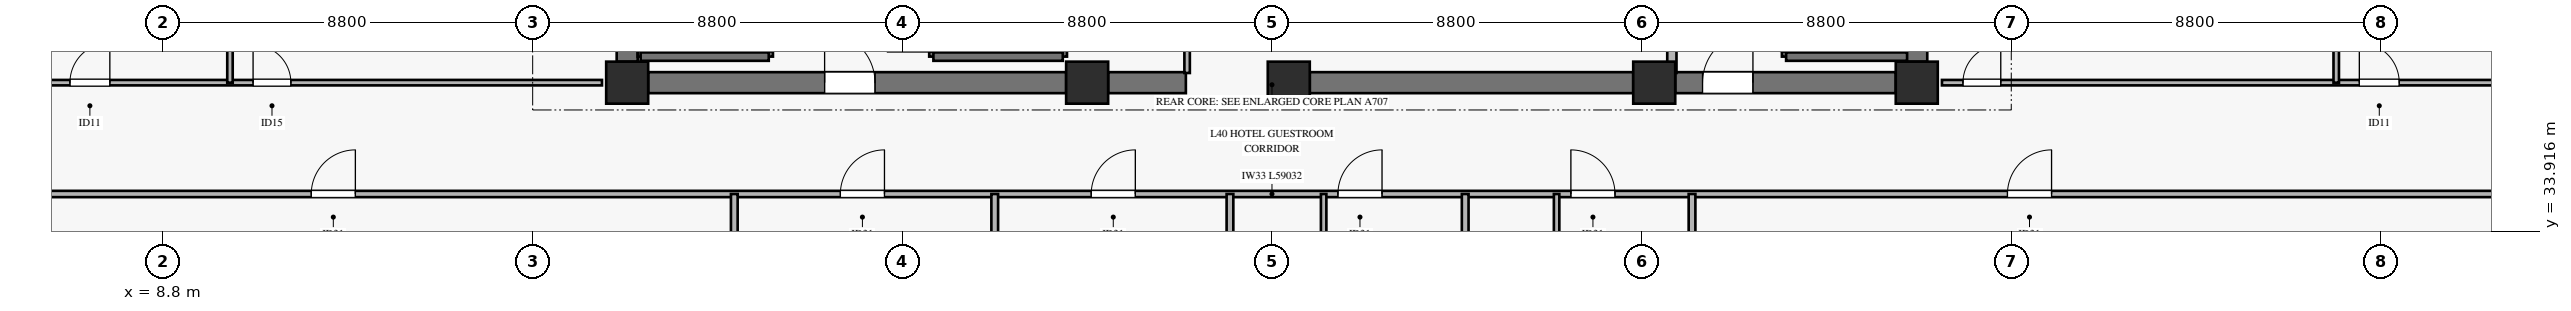
"""IFC4 building model, lengths in metres.
Left out: names, types, materials, properties, quantities, classifications, styles, units other than length and angle.
Written with IfcOpenShell. Run it as: python <this file> out.ifc"""

import sys

from ifc_helpers import new_model, si_unit, direction, frame, frame_2d, origin, origin_2d, place, context, subcontext, project, spatial, rectangle, extrude, source, transform, mapped, element, fill, save


model = new_model("IFC4")
c1 = context("Model", 3, precision=1e-05, world=origin(), true_north=direction((0.0, 1.0)))
c2 = subcontext(c1, "Body", "Model", "MODEL_VIEW")
j1 = project(units=[si_unit("LENGTHUNIT", "METRE"), si_unit("PLANEANGLEUNIT", "RADIAN")], contexts=[c1])
p1 = place(None, origin())
s1 = spatial("IfcSite", under=j1, at=p1, CompositionType="ELEMENT")
p2 = place(p1, origin())
s2 = spatial("IfcBuilding", under=s1, at=p2, CompositionType="ELEMENT")
p3 = place(p2, frame((0.0, 0.0, 163.2)))
s3 = spatial("IfcBuildingStorey", under=s2, at=p3, CompositionType="ELEMENT", Elevation=163.2)
m1 = source(origin(), c2, "Body", "SweptSolid", [
    extrude(rectangle(XDim=1.0, YDim=1.0, at=origin_2d()), origin(), (0.0, 0.0, 1.0), 3.27),
])
for number, where, z_axis, x_axis in (
    (1, (19.85, 37.45, 0.0), (0.0, 0.0, 1.0), (1.0, 0.0, 0.0)),
    (2, (30.8, 37.45, 0.0), (0.0, 0.0, 1.0), (1.0, 0.0, 0.0)),
    (3, (35.6, 37.45, 0.0), (0.0, 0.0, 1.0), (1.0, 0.0, 0.0)),
    (4, (44.3, 37.45, 0.0), (0.0, 0.0, 1.0), (1.0, 0.0, 0.0)),
    (5, (50.55, 37.45, 0.0), (0.0, 0.0, 1.0), (1.0, 0.0, 0.0)),
):
    element("IfcColumn", number, at=place(p3, frame(where, z_axis=z_axis, x_axis=x_axis)), inside=s3, PredefinedType="PILASTER", context=c2, shape_type="MappedRepresentation", body=[
        mapped(m1, transform((0.0, 0.0, 0.0), x_axis=(1.0, 0.0, 0.0), y_axis=(0.0, 1.0, 0.0), z_axis=(0.0, 0.0, 1.0), scale=1.0)),
    ])
p4 = place(p3, frame((20.35, 37.45, 0.0), z_axis=(0.0, 0.0, 1.0), x_axis=(1.0, 0.0, 0.0)))
e6 = element("IfcWall", 6, at=p4, inside=s3, PredefinedType="SHEAR", context=c2, shape_type="SweptSolid", body=[
    extrude(rectangle(XDim=9.95, YDim=0.5, at=frame_2d((4.975, 0.0))), origin(), (0.0, 0.0, 1.0), 3.27),
])
p5 = place(p4, frame((4.2, 0.0, 0.0)))
e7 = element("IfcOpeningElement", 7, at=p5, cuts=e6, PredefinedType="OPENING", context=c2, shape_type="SweptSolid", body=[
    extrude(rectangle(XDim=1.2, YDim=2.15, at=frame_2d((0.6, 1.075))), frame((0.0, 0.26, 0.0), z_axis=(0.0, -1.0, 0.0), x_axis=(1.0, 0.0, 0.0)), (0.0, 0.0, 1.0), 0.52),
])
p6 = place(p3, frame((31.3, 37.45, 0.0), z_axis=(0.0, 0.0, 1.0), x_axis=(1.0, 0.0, 0.0)))
e8 = element("IfcWall", 8, at=p6, inside=s3, PredefinedType="SHEAR", context=c2, shape_type="SweptSolid", body=[
    extrude(rectangle(XDim=1.85, YDim=0.5, at=frame_2d((0.925, 0.0))), origin(), (0.0, 0.0, 1.0), 3.27),
])
p7 = place(p3, frame((36.1, 37.45, 0.0), z_axis=(0.0, 0.0, 1.0), x_axis=(1.0, 0.0, 0.0)))
e9 = element("IfcWall", 9, at=p7, inside=s3, PredefinedType="SHEAR", context=c2, shape_type="SweptSolid", body=[
    extrude(rectangle(XDim=7.7, YDim=0.5, at=frame_2d((3.85, 0.0))), origin(), (0.0, 0.0, 1.0), 3.27),
])
p8 = place(p3, frame((44.8, 37.45, 0.0), z_axis=(0.0, 0.0, 1.0), x_axis=(1.0, 0.0, 0.0)))
e10 = element("IfcWall", 10, at=p8, inside=s3, PredefinedType="SHEAR", context=c2, shape_type="SweptSolid", body=[
    extrude(rectangle(XDim=5.25, YDim=0.5, at=frame_2d((2.625, 0.0))), origin(), (0.0, 0.0, 1.0), 3.27),
])
p9 = place(p8, frame((0.65, 0.0, 0.0)))
e11 = element("IfcOpeningElement", 11, at=p9, cuts=e10, PredefinedType="OPENING", context=c2, shape_type="SweptSolid", body=[
    extrude(rectangle(XDim=1.2, YDim=2.15, at=frame_2d((0.6, 1.075))), frame((0.0, 0.26, 0.0), z_axis=(0.0, -1.0, 0.0), x_axis=(1.0, 0.0, 0.0)), (0.0, 0.0, 1.0), 0.52),
])
for number, where, z_axis, x_axis in (
    (12, (19.85, 37.95, 0.0), (0.0, 0.0, 1.0), (0.0, 1.0, 0.0)),
    (13, (50.55, 37.95, 0.0), (0.0, 0.0, 1.0), (0.0, 1.0, 0.0)),
):
    element("IfcWall", number, at=place(p3, frame(where, z_axis=z_axis, x_axis=x_axis)), inside=s3, PredefinedType="SHEAR", context=c2, shape_type="SweptSolid", body=[
        extrude(rectangle(XDim=8.1, YDim=0.5, at=frame_2d((4.05, 0.0))), origin(), (0.0, 0.0, 1.0), 3.27),
    ])
p10 = place(p3, frame((20.17, 38.07, 0.0), z_axis=(0.0, 0.0, 1.0), x_axis=(0.0, 1.0, 0.0)))
e14 = element("IfcWall", 14, at=p10, inside=s3, PredefinedType="SOLIDWALL", context=c2, shape_type="SweptSolid", body=[
    extrude(rectangle(XDim=7.25, YDim=0.14, at=frame_2d((3.625, 0.0))), origin(), (0.0, 0.0, 1.0), 3.5),
])
p11 = place(p3, frame((23.22, 38.07, 0.0), z_axis=(0.0, 0.0, 1.0), x_axis=(0.0, 1.0, 0.0)))
e15 = element("IfcWall", 15, at=p11, inside=s3, PredefinedType="SOLIDWALL", context=c2, shape_type="SweptSolid", body=[
    extrude(rectangle(XDim=7.25, YDim=0.2, at=frame_2d((3.625, 0.0))), origin(), (0.0, 0.0, 1.0), 3.5),
])
p12 = place(p11, frame((0.11, 0.0, 0.0)))
e16 = element("IfcOpeningElement", 16, at=p12, cuts=e15, PredefinedType="OPENING", context=c2, shape_type="SweptSolid", body=[
    extrude(rectangle(XDim=1.1, YDim=2.15, at=frame_2d((0.55, 1.075))), frame((0.0, 0.11, 0.0), z_axis=(0.0, -1.0, 0.0), x_axis=(1.0, 0.0, 0.0)), (0.0, 0.0, 1.0), 0.22),
])
p13 = place(p3, frame((20.17, 38.07, 0.0), z_axis=(0.0, 0.0, 1.0), x_axis=(1.0, 0.0, 0.0)))
e17 = element("IfcWall", 17, at=p13, inside=s3, PredefinedType="SOLIDWALL", context=c2, shape_type="SweptSolid", body=[
    extrude(rectangle(XDim=3.05, YDim=0.2, at=frame_2d((1.525, 0.0))), origin(), (0.0, 0.0, 1.0), 3.5),
])
p14 = place(p3, frame((27.14, 38.07, 0.0), z_axis=(0.0, 0.0, 1.0), x_axis=(0.0, 1.0, 0.0)))
e18 = element("IfcWall", 18, at=p14, inside=s3, PredefinedType="SOLIDWALL", context=c2, shape_type="SweptSolid", body=[
    extrude(rectangle(XDim=7.25, YDim=0.2, at=frame_2d((3.625, 0.0))), origin(), (0.0, 0.0, 1.0), 3.5),
])
p15 = place(p14, frame((0.11, 0.0, 0.0)))
e19 = element("IfcOpeningElement", 19, at=p15, cuts=e18, PredefinedType="OPENING", context=c2, shape_type="SweptSolid", body=[
    extrude(rectangle(XDim=1.1, YDim=2.15, at=frame_2d((0.55, 1.075))), frame((0.0, 0.11, 0.0), z_axis=(0.0, -1.0, 0.0), x_axis=(1.0, 0.0, 0.0)), (0.0, 0.0, 1.0), 0.22),
])
p16 = place(p3, frame((30.22, 38.07, 0.0), z_axis=(0.0, 0.0, 1.0), x_axis=(0.0, 1.0, 0.0)))
e20 = element("IfcWall", 20, at=p16, inside=s3, PredefinedType="SOLIDWALL", context=c2, shape_type="SweptSolid", body=[
    extrude(rectangle(XDim=7.25, YDim=0.2, at=frame_2d((3.625, 0.0))), origin(), (0.0, 0.0, 1.0), 3.5),
])
p17 = place(p3, frame((27.14, 38.07, 0.0), z_axis=(0.0, 0.0, 1.0), x_axis=(1.0, 0.0, 0.0)))
e21 = element("IfcWall", 21, at=p17, inside=s3, PredefinedType="SOLIDWALL", context=c2, shape_type="SweptSolid", body=[
    extrude(rectangle(XDim=3.08, YDim=0.2, at=frame_2d((1.54, 0.0))), origin(), (0.0, 0.0, 1.0), 3.5),
])
p18 = place(p3, frame((47.44, 38.07, 0.0), z_axis=(0.0, 0.0, 1.0), x_axis=(0.0, 1.0, 0.0)))
e22 = element("IfcWall", 22, at=p18, inside=s3, PredefinedType="SOLIDWALL", context=c2, shape_type="SweptSolid", body=[
    extrude(rectangle(XDim=7.25, YDim=0.2, at=frame_2d((3.625, 0.0))), origin(), (0.0, 0.0, 1.0), 3.5),
])
p19 = place(p18, frame((0.11, 0.0, 0.0)))
e23 = element("IfcOpeningElement", 23, at=p19, cuts=e22, PredefinedType="OPENING", context=c2, shape_type="SweptSolid", body=[
    extrude(rectangle(XDim=1.1, YDim=2.15, at=frame_2d((0.55, 1.075))), frame((0.0, 0.11, 0.0), z_axis=(0.0, -1.0, 0.0), x_axis=(1.0, 0.0, 0.0)), (0.0, 0.0, 1.0), 0.22),
])
p20 = place(p3, frame((47.44, 38.07, 0.0), z_axis=(0.0, 0.0, 1.0), x_axis=(1.0, 0.0, 0.0)))
e24 = element("IfcWall", 24, at=p20, inside=s3, PredefinedType="SOLIDWALL", context=c2, shape_type="SweptSolid", body=[
    extrude(rectangle(XDim=2.88, YDim=0.2, at=frame_2d((1.44, 0.0))), origin(), (0.0, 0.0, 1.0), 3.5),
])
p21 = place(p3, frame((44.72, 37.68, 0.0), z_axis=(0.0, 0.0, 1.0), x_axis=(0.0, 1.0, 0.0)))
e25 = element("IfcWall", 25, at=p21, inside=s3, PredefinedType="SOLIDWALL", context=c2, shape_type="SweptSolid", body=[
    extrude(rectangle(XDim=7.54, YDim=0.22, at=frame_2d((3.77, 0.0))), origin(), (0.0, 0.0, 1.0), 3.27),
])
p22 = place(p3, frame((33.18, 37.68, 0.0), z_axis=(0.0, 0.0, 1.0), x_axis=(0.0, 1.0, 0.0)))
e26 = element("IfcWall", 26, at=p22, inside=s3, PredefinedType="PARTITIONING", context=c2, shape_type="SweptSolid", body=[
    extrude(rectangle(XDim=6.47, YDim=0.13, at=frame_2d((3.235, 0.0))), origin(), (0.0, 0.0, 1.0), 2.355),
])
p23 = place(p22, frame((2.22, 0.0, 0.0)))
e27 = element("IfcOpeningElement", 27, at=p23, cuts=e26, PredefinedType="OPENING", context=c2, shape_type="SweptSolid", body=[
    extrude(rectangle(XDim=0.9, YDim=2.1, at=frame_2d((0.45, 1.05))), frame((0.0, 0.075, 0.0), z_axis=(0.0, -1.0, 0.0), x_axis=(1.0, 0.0, 0.0)), (0.0, 0.0, 1.0), 0.15),
])
p24 = place(p3, frame((5.684, 34.8, 0.0), z_axis=(0.0, 0.0, 1.0), x_axis=(1.0, 0.0, 0.0)))
e28 = element("IfcWall", 28, at=p24, inside=s3, PredefinedType="PARTITIONING", context=c2, shape_type="SweptSolid", body=[
    extrude(rectangle(XDim=59.032, YDim=0.15, at=frame_2d((29.516, 0.0))), origin(), (0.0, 0.0, 1.0), 2.455),
])
p25 = place(p24, frame((6.645, 0.0, 0.0)))
e29 = element("IfcOpeningElement", 29, at=p25, cuts=e28, PredefinedType="OPENING", context=c2, shape_type="SweptSolid", body=[
    extrude(rectangle(XDim=1.05, YDim=2.15, at=frame_2d((0.525, 1.075))), frame((0.0, 0.085, 0.0), z_axis=(0.0, -1.0, 0.0), x_axis=(1.0, 0.0, 0.0)), (0.0, 0.0, 1.0), 0.17),
])
p26 = place(p24, frame((19.241, 0.0, 0.0)))
e30 = element("IfcOpeningElement", 30, at=p26, cuts=e28, PredefinedType="OPENING", context=c2, shape_type="SweptSolid", body=[
    extrude(rectangle(XDim=1.05, YDim=2.15, at=frame_2d((0.525, 1.075))), frame((0.0, 0.085, 0.0), z_axis=(0.0, -1.0, 0.0), x_axis=(1.0, 0.0, 0.0)), (0.0, 0.0, 1.0), 0.17),
])
p27 = place(p24, frame((25.213, 0.0, 0.0)))
e31 = element("IfcOpeningElement", 31, at=p27, cuts=e28, PredefinedType="OPENING", context=c2, shape_type="SweptSolid", body=[
    extrude(rectangle(XDim=1.05, YDim=2.15, at=frame_2d((0.525, 1.075))), frame((0.0, 0.085, 0.0), z_axis=(0.0, -1.0, 0.0), x_axis=(1.0, 0.0, 0.0)), (0.0, 0.0, 1.0), 0.17),
])
p28 = place(p24, frame((31.086, 0.0, 0.0)))
e32 = element("IfcOpeningElement", 32, at=p28, cuts=e28, PredefinedType="OPENING", context=c2, shape_type="SweptSolid", body=[
    extrude(rectangle(XDim=1.05, YDim=2.15, at=frame_2d((0.525, 1.075))), frame((0.0, 0.085, 0.0), z_axis=(0.0, -1.0, 0.0), x_axis=(1.0, 0.0, 0.0)), (0.0, 0.0, 1.0), 0.17),
])
p29 = place(p24, frame((36.632, 0.0, 0.0)))
e33 = element("IfcOpeningElement", 33, at=p29, cuts=e28, PredefinedType="OPENING", context=c2, shape_type="SweptSolid", body=[
    extrude(rectangle(XDim=1.05, YDim=2.15, at=frame_2d((0.525, 1.075))), frame((0.0, 0.085, 0.0), z_axis=(0.0, -1.0, 0.0), x_axis=(1.0, 0.0, 0.0)), (0.0, 0.0, 1.0), 0.17),
])
p30 = place(p24, frame((47.025, 0.0, 0.0)))
e34 = element("IfcOpeningElement", 34, at=p30, cuts=e28, PredefinedType="OPENING", context=c2, shape_type="SweptSolid", body=[
    extrude(rectangle(XDim=1.05, YDim=2.15, at=frame_2d((0.525, 1.075))), frame((0.0, 0.085, 0.0), z_axis=(0.0, -1.0, 0.0), x_axis=(1.0, 0.0, 0.0)), (0.0, 0.0, 1.0), 0.17),
])
for number, where, z_axis, x_axis in (
    (35, (22.4, 9.098, 0.0), (0.0, 0.0, 1.0), (0.0, 1.0, 0.0)),
    (36, (28.6, 9.098, 0.0), (0.0, 0.0, 1.0), (0.0, 1.0, 0.0)),
    (37, (34.2, 9.098, 0.0), (0.0, 0.0, 1.0), (0.0, 1.0, 0.0)),
):
    element("IfcWall", number, at=place(p3, frame(where, z_axis=z_axis, x_axis=x_axis)), inside=s3, PredefinedType="PARTITIONING", context=c2, shape_type="SweptSolid", body=[
        extrude(rectangle(XDim=25.702, YDim=0.16, at=frame_2d((12.851, 0.0))), origin(), (0.0, 0.0, 1.0), 2.755),
    ])
p31 = place(p3, frame((36.43, 32.25, 0.0), z_axis=(0.0, 0.0, 1.0), x_axis=(0.0, 1.0, 0.0)))
e38 = element("IfcWall", 38, at=p31, inside=s3, PredefinedType="PARTITIONING", context=c2, shape_type="SweptSolid", body=[
    extrude(rectangle(XDim=2.55, YDim=0.13, at=frame_2d((1.275, 0.0))), origin(), (0.0, 0.0, 1.0), 2.805),
])
p32 = place(p3, frame((39.8, 9.098, 0.0), z_axis=(0.0, 0.0, 1.0), x_axis=(0.0, 1.0, 0.0)))
e39 = element("IfcWall", 39, at=p32, inside=s3, PredefinedType="PARTITIONING", context=c2, shape_type="SweptSolid", body=[
    extrude(rectangle(XDim=25.702, YDim=0.16, at=frame_2d((12.851, 0.0))), origin(), (0.0, 0.0, 1.0), 2.755),
])
p33 = place(p3, frame((41.976, 32.25, 0.0), z_axis=(0.0, 0.0, 1.0), x_axis=(0.0, 1.0, 0.0)))
e40 = element("IfcWall", 40, at=p33, inside=s3, PredefinedType="PARTITIONING", context=c2, shape_type="SweptSolid", body=[
    extrude(rectangle(XDim=2.55, YDim=0.13, at=frame_2d((1.275, 0.0))), origin(), (0.0, 0.0, 1.0), 2.805),
])
p34 = place(p3, frame((45.2, 9.098, 0.0), z_axis=(0.0, 0.0, 1.0), x_axis=(0.0, 1.0, 0.0)))
e41 = element("IfcWall", 41, at=p34, inside=s3, PredefinedType="PARTITIONING", context=c2, shape_type="SweptSolid", body=[
    extrude(rectangle(XDim=25.702, YDim=0.16, at=frame_2d((12.851, 0.0))), origin(), (0.0, 0.0, 1.0), 2.755),
])
p35 = place(p3, frame((5.684, 37.45, 0.0), z_axis=(0.0, 0.0, 1.0), x_axis=(1.0, 0.0, 0.0)))
e42 = element("IfcWall", 42, at=p35, inside=s3, PredefinedType="PARTITIONING", context=c2, shape_type="SweptSolid", body=[
    extrude(rectangle(XDim=13.566, YDim=0.13, at=frame_2d((6.783, 0.0))), origin(), (0.0, 0.0, 1.0), 2.755),
])
p36 = place(p35, frame((0.9, 0.0, 0.0)))
e43 = element("IfcOpeningElement", 43, at=p36, cuts=e42, PredefinedType="OPENING", context=c2, shape_type="SweptSolid", body=[
    extrude(rectangle(XDim=0.95, YDim=2.1, at=frame_2d((0.475, 1.05))), frame((0.0, 0.075, 0.0), z_axis=(0.0, -1.0, 0.0), x_axis=(1.0, 0.0, 0.0)), (0.0, 0.0, 1.0), 0.15),
])
p37 = place(p35, frame((5.26, 0.0, 0.0)))
e44 = element("IfcOpeningElement", 44, at=p37, cuts=e42, PredefinedType="OPENING", context=c2, shape_type="SweptSolid", body=[
    extrude(rectangle(XDim=0.9, YDim=2.1, at=frame_2d((0.45, 1.05))), frame((0.0, 0.075, 0.0), z_axis=(0.0, -1.0, 0.0), x_axis=(1.0, 0.0, 0.0)), (0.0, 0.0, 1.0), 0.15),
])
p38 = place(p3, frame((10.394, 37.45, 0.0), z_axis=(0.0, 0.0, 1.0), x_axis=(0.0, 1.0, 0.0)))
e45 = element("IfcWall", 45, at=p38, inside=s3, PredefinedType="PARTITIONING", context=c2, shape_type="SweptSolid", body=[
    extrude(rectangle(XDim=8.8, YDim=0.13, at=frame_2d((4.4, 0.0))), origin(), (0.0, 0.0, 1.0), 3.27),
])
p39 = place(p3, frame((51.15, 37.45, 0.0), z_axis=(0.0, 0.0, 1.0), x_axis=(1.0, 0.0, 0.0)))
e46 = element("IfcWall", 46, at=p39, inside=s3, PredefinedType="PARTITIONING", context=c2, shape_type="SweptSolid", body=[
    extrude(rectangle(XDim=13.566, YDim=0.13, at=frame_2d((6.783, 0.0))), origin(), (0.0, 0.0, 1.0), 2.755),
])
p40 = place(p39, frame((0.5, 0.0, 0.0)))
e47 = element("IfcOpeningElement", 47, at=p40, cuts=e46, PredefinedType="OPENING", context=c2, shape_type="SweptSolid", body=[
    extrude(rectangle(XDim=0.9, YDim=2.1, at=frame_2d((0.45, 1.05))), frame((0.0, 0.075, 0.0), z_axis=(0.0, -1.0, 0.0), x_axis=(1.0, 0.0, 0.0)), (0.0, 0.0, 1.0), 0.15),
])
p41 = place(p39, frame((9.936, 0.0, 0.0)))
e48 = element("IfcOpeningElement", 48, at=p41, cuts=e46, PredefinedType="OPENING", context=c2, shape_type="SweptSolid", body=[
    extrude(rectangle(XDim=0.95, YDim=2.1, at=frame_2d((0.475, 1.05))), frame((0.0, 0.075, 0.0), z_axis=(0.0, -1.0, 0.0), x_axis=(1.0, 0.0, 0.0)), (0.0, 0.0, 1.0), 0.15),
])
p42 = place(p3, frame((60.536, 37.45, 0.0), z_axis=(0.0, 0.0, 1.0), x_axis=(0.0, 1.0, 0.0)))
e49 = element("IfcWall", 49, at=p42, inside=s3, PredefinedType="PARTITIONING", context=c2, shape_type="SweptSolid", body=[
    extrude(rectangle(XDim=8.8, YDim=0.13, at=frame_2d((4.4, 0.0))), origin(), (0.0, 0.0, 1.0), 3.27),
])
m2 = source(origin(), c2, "Body", "SweptSolid", [
    extrude(rectangle(XDim=1.2, YDim=2.15, at=frame_2d((0.6, 1.075))), frame((0.0, 0.025, 0.0), z_axis=(0.0, -1.0, 0.0), x_axis=(1.0, 0.0, 0.0)), (0.0, 0.0, 1.0), 0.05),
])
p43 = place(p5, origin())
e50 = element("IfcDoor", 50, at=p43, inside=s3, OperationType="SINGLE_SWING_LEFT", PredefinedType="DOOR", context=c2, shape_type="MappedRepresentation", body=[
    mapped(m2, transform((0.0, 0.0, 0.0), x_axis=(1.0, 0.0, 0.0), y_axis=(0.0, 1.0, 0.0), z_axis=(0.0, 0.0, 1.0), scale=1.0)),
])
fill(e7, e50)
p44 = place(p9, origin())
e51 = element("IfcDoor", 51, at=p44, inside=s3, OperationType="SINGLE_SWING_RIGHT", PredefinedType="DOOR", context=c2, shape_type="MappedRepresentation", body=[
    mapped(m2, transform((0.0, 0.0, 0.0), x_axis=(1.0, 0.0, 0.0), y_axis=(0.0, 1.0, 0.0), z_axis=(0.0, 0.0, 1.0), scale=1.0)),
])
fill(e11, e51)
m3 = source(origin(), c2, "Body", "SweptSolid", [
    extrude(rectangle(XDim=1.05, YDim=2.15, at=frame_2d((0.525, 1.075))), frame((0.0, 0.025, 0.0), z_axis=(0.0, -1.0, 0.0), x_axis=(1.0, 0.0, 0.0)), (0.0, 0.0, 1.0), 0.05),
])
p45 = place(p25, origin())
e52 = element("IfcDoor", 52, at=p45, inside=s3, OperationType="SINGLE_SWING_RIGHT", PredefinedType="DOOR", context=c2, shape_type="MappedRepresentation", body=[
    mapped(m3, transform((0.0, 0.0, 0.0), x_axis=(1.0, 0.0, 0.0), y_axis=(0.0, 1.0, 0.0), z_axis=(0.0, 0.0, 1.0), scale=1.0)),
])
fill(e29, e52)
p46 = place(p26, origin())
e53 = element("IfcDoor", 53, at=p46, inside=s3, OperationType="SINGLE_SWING_RIGHT", PredefinedType="DOOR", context=c2, shape_type="MappedRepresentation", body=[
    mapped(m3, transform((0.0, 0.0, 0.0), x_axis=(1.0, 0.0, 0.0), y_axis=(0.0, 1.0, 0.0), z_axis=(0.0, 0.0, 1.0), scale=1.0)),
])
fill(e30, e53)
p47 = place(p27, origin())
e54 = element("IfcDoor", 54, at=p47, inside=s3, OperationType="SINGLE_SWING_RIGHT", PredefinedType="DOOR", context=c2, shape_type="MappedRepresentation", body=[
    mapped(m3, transform((0.0, 0.0, 0.0), x_axis=(1.0, 0.0, 0.0), y_axis=(0.0, 1.0, 0.0), z_axis=(0.0, 0.0, 1.0), scale=1.0)),
])
fill(e31, e54)
p48 = place(p28, origin())
e55 = element("IfcDoor", 55, at=p48, inside=s3, OperationType="SINGLE_SWING_RIGHT", PredefinedType="DOOR", context=c2, shape_type="MappedRepresentation", body=[
    mapped(m3, transform((0.0, 0.0, 0.0), x_axis=(1.0, 0.0, 0.0), y_axis=(0.0, 1.0, 0.0), z_axis=(0.0, 0.0, 1.0), scale=1.0)),
])
fill(e32, e55)
p49 = place(p29, origin())
e56 = element("IfcDoor", 56, at=p49, inside=s3, OperationType="SINGLE_SWING_LEFT", PredefinedType="DOOR", context=c2, shape_type="MappedRepresentation", body=[
    mapped(m3, transform((0.0, 0.0, 0.0), x_axis=(1.0, 0.0, 0.0), y_axis=(0.0, 1.0, 0.0), z_axis=(0.0, 0.0, 1.0), scale=1.0)),
])
fill(e33, e56)
p50 = place(p30, origin())
e57 = element("IfcDoor", 57, at=p50, inside=s3, OperationType="SINGLE_SWING_RIGHT", PredefinedType="DOOR", context=c2, shape_type="MappedRepresentation", body=[
    mapped(m3, transform((0.0, 0.0, 0.0), x_axis=(1.0, 0.0, 0.0), y_axis=(0.0, 1.0, 0.0), z_axis=(0.0, 0.0, 1.0), scale=1.0)),
])
fill(e34, e57)
m4 = source(origin(), c2, "Body", "SweptSolid", [
    extrude(rectangle(XDim=0.95, YDim=2.1, at=frame_2d((0.475, 1.05))), frame((0.0, 0.025, 0.0), z_axis=(0.0, -1.0, 0.0), x_axis=(1.0, 0.0, 0.0)), (0.0, 0.0, 1.0), 0.05),
])
p51 = place(p36, origin())
e58 = element("IfcDoor", 58, at=p51, inside=s3, OperationType="SINGLE_SWING_RIGHT", PredefinedType="DOOR", context=c2, shape_type="MappedRepresentation", body=[
    mapped(m4, transform((0.0, 0.0, 0.0), x_axis=(1.0, 0.0, 0.0), y_axis=(0.0, 1.0, 0.0), z_axis=(0.0, 0.0, 1.0), scale=1.0)),
])
fill(e43, e58)
m5 = source(origin(), c2, "Body", "SweptSolid", [
    extrude(rectangle(XDim=0.9, YDim=2.1, at=frame_2d((0.45, 1.05))), frame((0.0, 0.025, 0.0), z_axis=(0.0, -1.0, 0.0), x_axis=(1.0, 0.0, 0.0)), (0.0, 0.0, 1.0), 0.05),
])
p52 = place(p37, origin())
e59 = element("IfcDoor", 59, at=p52, inside=s3, OperationType="SINGLE_SWING_LEFT", PredefinedType="DOOR", context=c2, shape_type="MappedRepresentation", body=[
    mapped(m5, transform((0.0, 0.0, 0.0), x_axis=(1.0, 0.0, 0.0), y_axis=(0.0, 1.0, 0.0), z_axis=(0.0, 0.0, 1.0), scale=1.0)),
])
fill(e44, e59)
p53 = place(p40, origin())
e60 = element("IfcDoor", 60, at=p53, inside=s3, OperationType="SINGLE_SWING_RIGHT", PredefinedType="DOOR", context=c2, shape_type="MappedRepresentation", body=[
    mapped(m5, transform((0.0, 0.0, 0.0), x_axis=(1.0, 0.0, 0.0), y_axis=(0.0, 1.0, 0.0), z_axis=(0.0, 0.0, 1.0), scale=1.0)),
])
fill(e47, e60)
p54 = place(p41, origin())
e61 = element("IfcDoor", 61, at=p54, inside=s3, OperationType="SINGLE_SWING_LEFT", PredefinedType="DOOR", context=c2, shape_type="MappedRepresentation", body=[
    mapped(m4, transform((0.0, 0.0, 0.0), x_axis=(1.0, 0.0, 0.0), y_axis=(0.0, 1.0, 0.0), z_axis=(0.0, 0.0, 1.0), scale=1.0)),
])
fill(e48, e61)
save(model, sys.argv[1])
